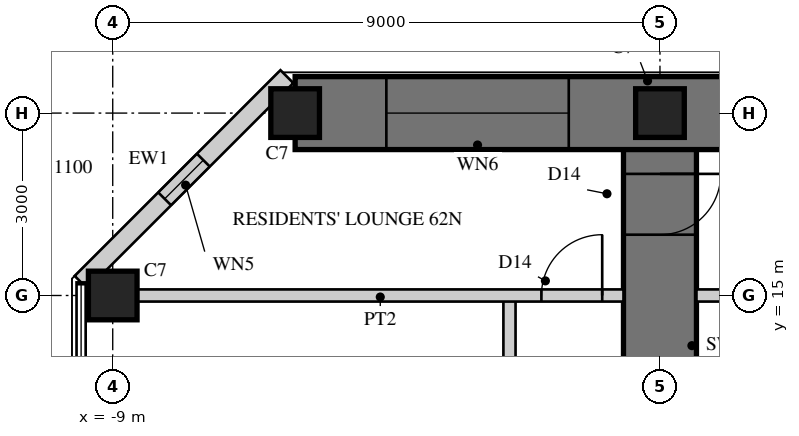
"""IFC4 building model, lengths in metres.
Left out: names, types, materials, properties, quantities, classifications, styles, units other than length and angle.
Written with IfcOpenShell. Run it as: python <this file> out.ifc"""

import sys

from ifc_helpers import new_model, si_unit, direction, frame, frame_2d, origin, origin_2d, place, context, subcontext, project, spatial, rectangle, hollow_rectangle, extrude, element, fill, save


model = new_model("IFC4")
c1 = context("Model", 3, precision=1e-05, world=origin(), true_north=direction((0.0, 1.0)))
c2 = subcontext(c1, "Body", "Model", "MODEL_VIEW")
j1 = project(units=[si_unit("LENGTHUNIT", "METRE"), si_unit("PLANEANGLEUNIT", "RADIAN")], contexts=[c1])
p1 = place(None, origin())
s1 = spatial("IfcSite", under=j1, at=p1, CompositionType="ELEMENT")
p2 = place(p1, origin())
s2 = spatial("IfcBuilding", under=s1, at=p2, CompositionType="ELEMENT")
p3 = place(p2, frame((0.0, 0.0, 242.5)))
s3 = spatial("IfcBuildingStorey", under=s2, at=p3, CompositionType="ELEMENT", Elevation=242.5)
p4 = place(p3, frame((0.0, 9.0, 0.0), z_axis=(0.0, 0.0, 1.0), x_axis=(0.0, 1.0, 0.0)))
e1 = element("IfcWall", 1, at=p4, inside=s3, PredefinedType="SHEAR", context=c2, shape_type="SweptSolid", body=[
    extrude(rectangle(XDim=9.0, YDim=1.2, at=frame_2d((4.5, 0.0))), origin(), (0.0, 0.0, 1.0), 3.4),
])
p5 = place(p4, frame((3.8, 0.0, 0.0)))
e2 = element("IfcOpeningElement", 2, at=p5, cuts=e1, PredefinedType="OPENING", context=c2, shape_type="SweptSolid", body=[
    extrude(rectangle(XDim=1.0, YDim=2.15, at=frame_2d((0.5, 1.075))), frame((0.0, 0.61, 0.0), z_axis=(0.0, -1.0, 0.0), x_axis=(1.0, 0.0, 0.0)), (0.0, 0.0, 1.0), 1.22),
])
p6 = place(p4, frame((7.0, 0.0, 0.0)))
e3 = element("IfcOpeningElement", 3, at=p6, cuts=e1, PredefinedType="OPENING", context=c2, shape_type="SweptSolid", body=[
    extrude(rectangle(XDim=1.0, YDim=2.2, at=frame_2d((0.5, 1.1))), frame((0.0, 0.61, 0.0), z_axis=(0.0, -1.0, 0.0), x_axis=(1.0, 0.0, 0.0)), (0.0, 0.0, 1.0), 1.22),
])
p7 = place(p3, frame((6.0, 18.0, 0.0), z_axis=(0.0, 0.0, 1.0), x_axis=(-1.0, 0.0, 0.0)))
e4 = element("IfcWall", 4, at=p7, inside=s3, PredefinedType="SHEAR", context=c2, shape_type="SweptSolid", body=[
    extrude(rectangle(XDim=12.0, YDim=1.2, at=frame_2d((6.0, 0.0))), origin(), (0.0, 0.0, 1.0), 3.4),
])
p8 = place(p7, frame((1.5, 0.0, 0.6)))
e5 = element("IfcOpeningElement", 5, at=p8, cuts=e4, PredefinedType="OPENING", context=c2, shape_type="SweptSolid", body=[
    extrude(rectangle(XDim=3.0, YDim=2.4, at=frame_2d((1.5, 1.2))), frame((0.0, 0.61, 0.0), z_axis=(0.0, -1.0, 0.0), x_axis=(1.0, 0.0, 0.0)), (0.0, 0.0, 1.0), 1.22),
])
p9 = place(p7, frame((7.5, 0.0, 0.6)))
e6 = element("IfcOpeningElement", 6, at=p9, cuts=e4, PredefinedType="OPENING", context=c2, shape_type="SweptSolid", body=[
    extrude(rectangle(XDim=3.0, YDim=2.4, at=frame_2d((1.5, 1.2))), frame((0.0, 0.61, 0.0), z_axis=(0.0, -1.0, 0.0), x_axis=(1.0, 0.0, 0.0)), (0.0, 0.0, 1.0), 1.22),
])
for number, where, z_axis, x_axis in (
    (7, (-9.0, 15.0, 0.0), (0.0, 0.0, 1.0), (1.0, 0.0, 0.0)),
    (8, (0.0, 18.0, 0.0), (0.0, 0.0, 1.0), (1.0, 0.0, 0.0)),
    (9, (-6.0, 18.0, 0.0), (0.0, 0.0, 1.0), (1.0, 0.0, 0.0)),
):
    element("IfcColumn", number, at=place(p3, frame(where, z_axis=z_axis, x_axis=x_axis)), inside=s3, PredefinedType="COLUMN", context=c2, shape_type="SweptSolid", body=[
        extrude(rectangle(XDim=0.8, YDim=0.8, at=origin_2d()), origin(), (0.0, 0.0, 1.0), 3.4),
    ])
p10 = place(p3, frame((-6.135, 18.6, 0.0), z_axis=(0.0, 0.0, 1.0), x_axis=(-0.707081278264, -0.707132283189, 0.0)))
e10 = element("IfcWall", 10, at=p10, inside=s3, PredefinedType="SOLIDWALL", context=c2, shape_type="SweptSolid", body=[
    extrude(rectangle(XDim=4.787, YDim=0.3, at=frame_2d((2.393, 0.0))), origin(), (0.0, 0.0, 1.0), 3.22),
])
p11 = place(p10, frame((1.943, 0.0, 0.3)))
e11 = element("IfcOpeningElement", 11, at=p11, cuts=e10, PredefinedType="OPENING", context=c2, shape_type="SweptSolid", body=[
    extrude(rectangle(XDim=0.9, YDim=2.4, at=frame_2d((0.45, 1.2))), frame((0.0, 0.16, 0.0), z_axis=(0.0, -1.0, 0.0), x_axis=(1.0, 0.0, 0.0)), (0.0, 0.0, 1.0), 0.32),
])
p12 = place(p3, frame((-2.475, 9.4, 0.0), z_axis=(0.0, 0.0, 1.0), x_axis=(0.0, 1.0, 0.0)))
e12 = element("IfcWall", 12, at=p12, inside=s3, PredefinedType="SOLIDWALL", context=c2, shape_type="SweptSolid", body=[
    extrude(rectangle(XDim=5.6, YDim=0.2, at=frame_2d((2.8, 0.0))), origin(), (0.0, 0.0, 1.0), 3.22),
])
p13 = place(p12, frame((1.2, 0.0, 0.0)))
e13 = element("IfcOpeningElement", 13, at=p13, cuts=e12, PredefinedType="OPENING", context=c2, shape_type="SweptSolid", body=[
    extrude(rectangle(XDim=1.0, YDim=2.2, at=frame_2d((0.5, 1.1))), frame((0.0, 0.11, 0.0), z_axis=(0.0, -1.0, 0.0), x_axis=(1.0, 0.0, 0.0)), (0.0, 0.0, 1.0), 0.22),
])
p14 = place(p3, frame((8.6, 15.0, 0.0), z_axis=(0.0, 0.0, 1.0), x_axis=(-1.0, 0.0, 0.0)))
e14 = element("IfcWall", 14, at=p14, inside=s3, PredefinedType="SOLIDWALL", context=c2, shape_type="SweptSolid", body=[
    extrude(rectangle(XDim=8.0, YDim=0.2, at=frame_2d((4.0, 0.0))), origin(), (0.0, 0.0, 1.0), 2.52),
])
p15 = place(p3, frame((-0.6, 15.0, 0.0), z_axis=(0.0, 0.0, 1.0), x_axis=(-1.0, 0.0, 0.0)))
e15 = element("IfcWall", 15, at=p15, inside=s3, PredefinedType="SOLIDWALL", context=c2, shape_type="SweptSolid", body=[
    extrude(rectangle(XDim=8.0, YDim=0.2, at=frame_2d((4.0, 0.0))), origin(), (0.0, 0.0, 1.0), 2.52),
])
p16 = place(p15, frame((0.35, 0.0, 0.0)))
e16 = element("IfcOpeningElement", 16, at=p16, cuts=e15, PredefinedType="OPENING", context=c2, shape_type="SweptSolid", body=[
    extrude(rectangle(XDim=1.0, YDim=2.2, at=frame_2d((0.5, 1.1))), frame((0.0, 0.11, 0.0), z_axis=(0.0, -1.0, 0.0), x_axis=(1.0, 0.0, 0.0)), (0.0, 0.0, 1.0), 0.22),
])
p17 = place(p9, origin())
e17 = element("IfcWindow", 17, at=p17, inside=s3, PartitioningType="SINGLE_PANEL", PredefinedType="WINDOW", context=c2, shape_type="SweptSolid", body=[
    extrude(hollow_rectangle(XDim=3.0, YDim=2.4, WallThickness=0.06, at=frame_2d((1.5, 1.2))), frame((0.0, 0.03, 0.0), z_axis=(0.0, -1.0, 0.0), x_axis=(1.0, 0.0, 0.0)), (0.0, 0.0, 1.0), 0.06),
    extrude(rectangle(XDim=2.879, YDim=2.279, at=frame_2d((1.5, 1.2))), frame((0.0, 0.03, 0.0), z_axis=(0.0, -1.0, 0.0), x_axis=(1.0, 0.0, 0.0)), (0.0, 0.0, 1.0), 0.06),
])
fill(e6, e17)
p18 = place(p11, origin())
e18 = element("IfcWindow", 18, at=p18, inside=s3, PartitioningType="SINGLE_PANEL", PredefinedType="WINDOW", context=c2, shape_type="SweptSolid", body=[
    extrude(hollow_rectangle(XDim=0.9, YDim=2.4, WallThickness=0.06, at=frame_2d((0.45, 1.2))), frame((0.0, 0.03, 0.0), z_axis=(0.0, -1.0, 0.0), x_axis=(1.0, 0.0, 0.0)), (0.0, 0.0, 1.0), 0.06),
    extrude(rectangle(XDim=0.779, YDim=2.279, at=frame_2d((0.45, 1.2))), frame((0.0, 0.03, 0.0), z_axis=(0.0, -1.0, 0.0), x_axis=(1.0, 0.0, 0.0)), (0.0, 0.0, 1.0), 0.06),
])
fill(e11, e18)
p19 = place(p16, frame((1.0, 0.0, 0.0), z_axis=(0.0, 0.0, 1.0), x_axis=(-1.0, 0.0, 0.0)))
e19 = element("IfcDoor", 19, at=p19, inside=s3, OperationType="SINGLE_SWING_RIGHT", PredefinedType="DOOR", context=c2, shape_type="SweptSolid", body=[
    extrude(rectangle(XDim=1.0, YDim=2.2, at=frame_2d((0.5, 1.1))), frame((0.0, 0.025, 0.0), z_axis=(0.0, -1.0, 0.0), x_axis=(1.0, 0.0, 0.0)), (0.0, 0.0, 1.0), 0.05),
])
fill(e16, e19)
p20 = place(p6, frame((1.0, 0.0, 0.0), z_axis=(0.0, 0.0, 1.0), x_axis=(-1.0, 0.0, 0.0)))
e20 = element("IfcDoor", 20, at=p20, inside=s3, OperationType="SINGLE_SWING_LEFT", PredefinedType="DOOR", context=c2, shape_type="SweptSolid", body=[
    extrude(rectangle(XDim=1.0, YDim=2.2, at=frame_2d((0.5, 1.1))), frame((0.0, 0.025, 0.0), z_axis=(0.0, -1.0, 0.0), x_axis=(1.0, 0.0, 0.0)), (0.0, 0.0, 1.0), 0.05),
])
fill(e3, e20)
save(model, sys.argv[1])
